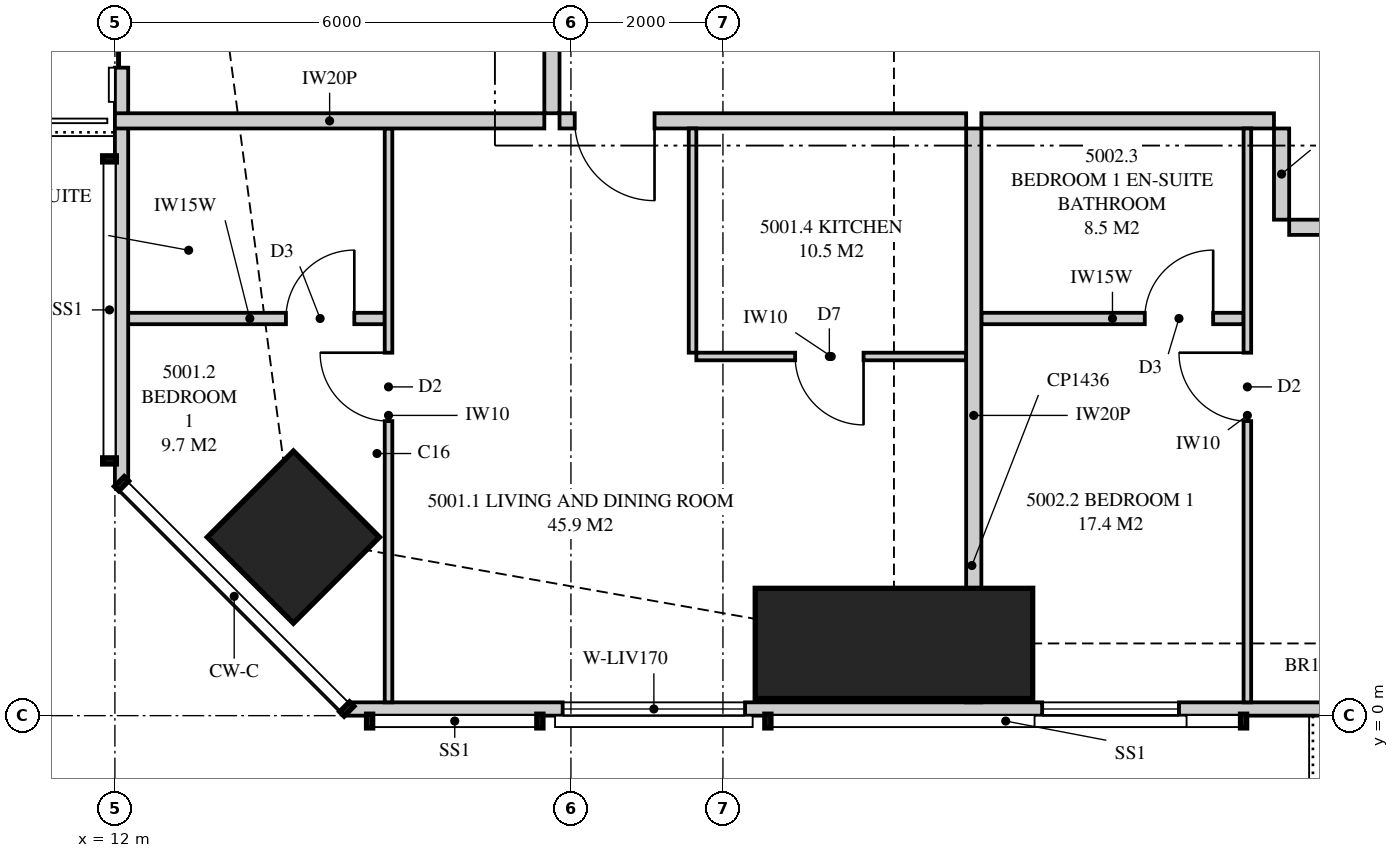
"""IFC4 building model, lengths in metres.
Left out: names, types, materials, properties, quantities, classifications, styles, units other than length and angle.
Written with IfcOpenShell. Run it as: python <this file> out.ifc"""

import sys

from ifc_helpers import new_model, si_unit, direction, frame, frame_2d, origin, origin_2d, place, context, subcontext, project, spatial, polyline, rectangle, outline, extrude, element, fill, save


model = new_model("IFC4")
c1 = context("Model", 3, precision=1e-05, world=origin(), true_north=direction((0.0, 1.0)))
c2 = subcontext(c1, "Body", "Model", "MODEL_VIEW")
j1 = project(units=[si_unit("LENGTHUNIT", "METRE"), si_unit("PLANEANGLEUNIT", "RADIAN")], contexts=[c1])
p1 = place(None, origin())
s1 = spatial("IfcSite", under=j1, at=p1, CompositionType="ELEMENT")
p2 = place(p1, origin())
s2 = spatial("IfcBuilding", under=s1, at=p2, CompositionType="ELEMENT")
p3 = place(p2, frame((0.0, 0.0, 184.5)))
s3 = spatial("IfcBuildingStorey", under=s2, at=p3, CompositionType="ELEMENT", Elevation=184.5)
p4 = place(p3, frame((14.348, 2.348, 0.0), z_axis=(0.0, 0.0, 1.0), x_axis=(0.707106781187, 0.707106781187, 0.0)))
e1 = element("IfcColumn", 1, at=p4, inside=s3, PredefinedType="COLUMN", context=c2, shape_type="SweptSolid", body=[
    extrude(rectangle(XDim=1.6, YDim=1.6, at=origin_2d()), origin(), (0.0, 0.0, 1.0), 3.35),
])
p5 = place(p3, frame((22.25, 0.95, 0.0), z_axis=(0.0, 0.0, 1.0), x_axis=(0.0, 1.0, 0.0)))
e2 = element("IfcColumn", 2, at=p5, inside=s3, PredefinedType="COLUMN", context=c2, shape_type="SweptSolid", body=[
    extrude(rectangle(XDim=1.45, YDim=3.65, at=origin_2d()), origin(), (0.0, 0.0, 1.0), 3.35),
])
p6 = place(p3, frame((15.051, 0.087, 0.0), z_axis=(0.0, 0.0, 1.0), x_axis=(1.0, 0.0, 0.0)))
e3 = element("IfcWall", 3, at=p6, inside=s3, PredefinedType="SOLIDWALL", context=c2, shape_type="SweptSolid", body=[
    extrude(outline(polyline([(0.0, 0.0), (34.897, 0.0), (34.897, 3.11), (27.91, 3.11), (27.91, 2.15), (27.836, 2.15), (27.836, 3.11), (27.699, 3.11), (27.699, 2.15), (7.199, 2.15), (7.199, 3.11), (7.062, 3.11), (7.062, 2.15), (6.987, 2.15), (6.987, 3.11), (0.0, 3.11), (0.0, 0.0)])), frame((0.0, 0.087, 0.0), z_axis=(0.0, -1.0, 0.0), x_axis=(1.0, 0.0, 0.0)), (0.0, 0.0, 1.0), 0.175),
])
p7 = place(p6, frame((2.84, 0.0, 0.4)))
e4 = element("IfcOpeningElement", 4, at=p7, cuts=e3, PredefinedType="OPENING", context=c2, shape_type="SweptSolid", body=[
    extrude(rectangle(XDim=2.4, YDim=1.7, at=frame_2d((1.2, 0.85))), frame((0.0, 0.097, 0.0), z_axis=(0.0, -1.0, 0.0), x_axis=(1.0, 0.0, 0.0)), (0.0, 0.0, 1.0), 0.195),
])
p8 = place(p6, frame((9.149, 0.0, 0.4)))
e5 = element("IfcOpeningElement", 5, at=p8, cuts=e3, PredefinedType="OPENING", context=c2, shape_type="SweptSolid", body=[
    extrude(rectangle(XDim=1.8, YDim=1.7, at=frame_2d((0.9, 0.85))), frame((0.0, 0.097, 0.0), z_axis=(0.0, -1.0, 0.0), x_axis=(1.0, 0.0, 0.0)), (0.0, 0.0, 1.0), 0.195),
])
p9 = place(p6, frame((13.561, 0.0, 0.0)))
e6 = element("IfcOpeningElement", 6, at=p9, cuts=e3, PredefinedType="OPENING", context=c2, shape_type="SweptSolid", body=[
    extrude(rectangle(XDim=1.8, YDim=2.1, at=frame_2d((0.9, 1.05))), frame((0.0, 0.097, 0.0), z_axis=(0.0, -1.0, 0.0), x_axis=(1.0, 0.0, 0.0)), (0.0, 0.0, 1.0), 0.195),
])
p10 = place(p6, frame((19.849, 0.0, 0.4)))
e7 = element("IfcOpeningElement", 7, at=p10, cuts=e3, PredefinedType="OPENING", context=c2, shape_type="SweptSolid", body=[
    extrude(rectangle(XDim=1.8, YDim=1.7, at=frame_2d((0.9, 0.85))), frame((0.0, 0.097, 0.0), z_axis=(0.0, -1.0, 0.0), x_axis=(1.0, 0.0, 0.0)), (0.0, 0.0, 1.0), 0.195),
])
p11 = place(p6, frame((23.449, 0.0, 0.4)))
e8 = element("IfcOpeningElement", 8, at=p11, cuts=e3, PredefinedType="OPENING", context=c2, shape_type="SweptSolid", body=[
    extrude(rectangle(XDim=1.8, YDim=1.7, at=frame_2d((0.9, 0.85))), frame((0.0, 0.097, 0.0), z_axis=(0.0, -1.0, 0.0), x_axis=(1.0, 0.0, 0.0)), (0.0, 0.0, 1.0), 0.195),
])
p12 = place(p6, frame((29.636, 0.0, 0.4)))
e9 = element("IfcOpeningElement", 9, at=p12, cuts=e3, PredefinedType="OPENING", context=c2, shape_type="SweptSolid", body=[
    extrude(rectangle(XDim=1.8, YDim=1.7, at=frame_2d((0.9, 0.85))), frame((0.0, 0.097, 0.0), z_axis=(0.0, -1.0, 0.0), x_axis=(1.0, 0.0, 0.0)), (0.0, 0.0, 1.0), 0.195),
])
p13 = place(p6, frame((32.56, 0.0, 0.4)))
e10 = element("IfcOpeningElement", 10, at=p13, cuts=e3, PredefinedType="OPENING", context=c2, shape_type="SweptSolid", body=[
    extrude(rectangle(XDim=1.8, YDim=1.7, at=frame_2d((0.9, 0.85))), frame((0.0, 0.097, 0.0), z_axis=(0.0, -1.0, 0.0), x_axis=(1.0, 0.0, 0.0)), (0.0, 0.0, 1.0), 0.195),
])
p14 = place(p3, frame((12.087, 32.949, 0.0), z_axis=(0.0, 0.0, 1.0), x_axis=(0.0, -1.0, 0.0)))
e11 = element("IfcWall", 11, at=p14, inside=s3, PredefinedType="SOLIDWALL", context=c2, shape_type="SweptSolid", body=[
    extrude(outline(polyline([(0.0, 0.0), (29.897, 0.0), (29.897, 3.11), (20.191, 3.11), (20.191, 2.15), (20.051, 2.15), (20.051, 3.11), (19.949, 3.11), (19.949, 2.15), (7.949, 2.15), (7.949, 3.11), (7.823, 3.11), (7.823, 2.15), (7.73, 2.15), (7.73, 3.11), (0.0, 3.11), (0.0, 0.0)])), frame((0.0, 0.087, 0.0), z_axis=(0.0, -1.0, 0.0), x_axis=(1.0, 0.0, 0.0)), (0.0, 0.0, 1.0), 0.175),
])
p15 = place(p14, frame((1.599, 0.0, 0.4)))
e12 = element("IfcOpeningElement", 12, at=p15, cuts=e11, PredefinedType="OPENING", context=c2, shape_type="SweptSolid", body=[
    extrude(rectangle(XDim=1.2, YDim=1.7, at=frame_2d((0.6, 0.85))), frame((0.0, 0.097, 0.0), z_axis=(0.0, -1.0, 0.0), x_axis=(1.0, 0.0, 0.0)), (0.0, 0.0, 1.0), 0.195),
])
p16 = place(p14, frame((9.899, 0.0, 0.4)))
e13 = element("IfcOpeningElement", 13, at=p16, cuts=e11, PredefinedType="OPENING", context=c2, shape_type="SweptSolid", body=[
    extrude(rectangle(XDim=1.8, YDim=1.7, at=frame_2d((0.9, 0.85))), frame((0.0, 0.097, 0.0), z_axis=(0.0, -1.0, 0.0), x_axis=(1.0, 0.0, 0.0)), (0.0, 0.0, 1.0), 0.195),
])
p17 = place(p14, frame((13.024, 0.0, 0.4)))
e14 = element("IfcOpeningElement", 14, at=p17, cuts=e11, PredefinedType="OPENING", context=c2, shape_type="SweptSolid", body=[
    extrude(rectangle(XDim=1.8, YDim=1.7, at=frame_2d((0.9, 0.85))), frame((0.0, 0.097, 0.0), z_axis=(0.0, -1.0, 0.0), x_axis=(1.0, 0.0, 0.0)), (0.0, 0.0, 1.0), 0.195),
])
p18 = place(p14, frame((16.201, 0.0, 0.4)))
e15 = element("IfcOpeningElement", 15, at=p18, cuts=e11, PredefinedType="OPENING", context=c2, shape_type="SweptSolid", body=[
    extrude(rectangle(XDim=1.8, YDim=1.7, at=frame_2d((0.9, 0.85))), frame((0.0, 0.097, 0.0), z_axis=(0.0, -1.0, 0.0), x_axis=(1.0, 0.0, 0.0)), (0.0, 0.0, 1.0), 0.195),
])
p19 = place(p14, frame((22.624, 0.0, 0.0)))
e16 = element("IfcOpeningElement", 16, at=p19, cuts=e11, PredefinedType="OPENING", context=c2, shape_type="SweptSolid", body=[
    extrude(rectangle(XDim=1.8, YDim=2.1, at=frame_2d((0.9, 1.05))), frame((0.0, 0.097, 0.0), z_axis=(0.0, -1.0, 0.0), x_axis=(1.0, 0.0, 0.0)), (0.0, 0.0, 1.0), 0.195),
])
p20 = place(p3, frame((23.3, 0.175, 0.0), z_axis=(0.0, 0.0, 1.0), x_axis=(0.0, 1.0, 0.0)))
e17 = element("IfcWall", 17, at=p20, inside=s3, PredefinedType="PARTITIONING", context=c2, shape_type="SweptSolid", body=[
    extrude(outline(polyline([(0.529, 2.15), (0.0, 2.15), (0.0, 0.0), (0.529, 0.0), (0.529, 0.472), (1.021, 0.472), (1.021, 0.0), (7.55, 0.0), (7.55, 3.11), (1.685, 3.11), (1.685, 2.15), (1.021, 2.15), (1.021, 1.678), (0.529, 1.678), (0.529, 2.15)])), frame((0.0, 0.1, 0.0), z_axis=(0.0, -1.0, 0.0), x_axis=(1.0, 0.0, 0.0)), (0.0, 0.0, 1.0), 0.2),
])
p21 = place(p3, frame((17.85, 7.825, 0.0), z_axis=(0.0, 0.0, 1.0), x_axis=(1.0, 0.0, 0.0)))
e18 = element("IfcWall", 18, at=p21, inside=s3, PredefinedType="PARTITIONING", context=c2, shape_type="SweptSolid", body=[
    extrude(outline(polyline([(0.0, 0.0), (5.35, 0.0), (5.35, 3.11), (4.737, 3.11), (4.737, 2.541), (4.062, 2.541), (4.062, 3.11), (0.0, 3.11), (0.0, 0.0)])), frame((0.0, 0.1, 0.0), z_axis=(0.0, -1.0, 0.0), x_axis=(1.0, 0.0, 0.0)), (0.0, 0.0, 1.0), 0.2),
])
p22 = place(p21, frame((0.2, 0.0, 0.0)))
e19 = element("IfcOpeningElement", 19, at=p22, cuts=e18, PredefinedType="OPENING", context=c2, shape_type="SweptSolid", body=[
    extrude(rectangle(XDim=1.05, YDim=2.2, at=frame_2d((0.525, 1.1))), frame((0.0, 0.11, 0.0), z_axis=(0.0, -1.0, 0.0), x_axis=(1.0, 0.0, 0.0)), (0.0, 0.0, 1.0), 0.22),
])
p23 = place(p3, frame((15.6, 0.175, 0.0), z_axis=(0.0, 0.0, 1.0), x_axis=(0.0, 1.0, 0.0)))
e20 = element("IfcWall", 20, at=p23, inside=s3, PredefinedType="PARTITIONING", context=c2, shape_type="SweptSolid", body=[
    extrude(outline(polyline([(0.0, 0.0), (7.55, 0.0), (7.55, 3.11), (2.825, 3.11), (2.825, 2.15), (1.079, 2.15), (1.079, 3.11), (0.0, 3.11), (0.0, 0.0)])), frame((0.0, 0.05, 0.0), z_axis=(0.0, -1.0, 0.0), x_axis=(1.0, 0.0, 0.0)), (0.0, 0.0, 1.0), 0.1),
])
p24 = place(p23, frame((3.7, 0.0, 0.0)))
e21 = element("IfcOpeningElement", 21, at=p24, cuts=e20, PredefinedType="OPENING", context=c2, shape_type="SweptSolid", body=[
    extrude(rectangle(XDim=0.9, YDim=2.1, at=frame_2d((0.45, 1.05))), frame((0.0, 0.06, 0.0), z_axis=(0.0, -1.0, 0.0), x_axis=(1.0, 0.0, 0.0)), (0.0, 0.0, 1.0), 0.12),
])
p25 = place(p3, frame((12.0, 5.225, 0.0), z_axis=(0.0, 0.0, 1.0), x_axis=(1.0, 0.0, 0.0)))
e22 = element("IfcWall", 22, at=p25, inside=s3, PredefinedType="PLUMBINGWALL", context=c2, shape_type="SweptSolid", body=[
    extrude(outline(polyline([(0.0, 0.0), (3.55, 0.0), (3.55, 3.11), (2.863, 3.11), (2.863, 2.15), (1.078, 2.15), (1.078, 3.11), (0.0, 3.11), (0.0, 0.0)])), frame((0.0, 0.075, 0.0), z_axis=(0.0, -1.0, 0.0), x_axis=(1.0, 0.0, 0.0)), (0.0, 0.0, 1.0), 0.15),
])
p26 = place(p25, frame((2.25, 0.0, 0.0)))
e23 = element("IfcOpeningElement", 23, at=p26, cuts=e22, PredefinedType="OPENING", context=c2, shape_type="SweptSolid", body=[
    extrude(rectangle(XDim=0.9, YDim=2.1, at=frame_2d((0.45, 1.05))), frame((0.0, 0.085, 0.0), z_axis=(0.0, -1.0, 0.0), x_axis=(1.0, 0.0, 0.0)), (0.0, 0.0, 1.0), 0.17),
])
p27 = place(p3, frame((19.65, 4.725, 0.0), z_axis=(0.0, 0.0, 1.0), x_axis=(1.0, 0.0, 0.0)))
e24 = element("IfcWall", 24, at=p27, inside=s3, PredefinedType="PARTITIONING", context=c2, shape_type="SweptSolid", body=[
    extrude(outline(polyline([(0.0, 0.0), (3.55, 0.0), (3.55, 3.11), (2.887, 3.11), (2.887, 2.541), (2.312, 2.541), (2.312, 3.11), (0.0, 3.11), (0.0, 0.0)])), frame((0.0, 0.05, 0.0), z_axis=(0.0, -1.0, 0.0), x_axis=(1.0, 0.0, 0.0)), (0.0, 0.0, 1.0), 0.1),
])
p28 = place(p27, frame((1.3, 0.0, 0.0)))
e25 = element("IfcOpeningElement", 25, at=p28, cuts=e24, PredefinedType="OPENING", context=c2, shape_type="SweptSolid", body=[
    extrude(rectangle(XDim=0.9, YDim=2.1, at=frame_2d((0.45, 1.05))), frame((0.0, 0.06, 0.0), z_axis=(0.0, -1.0, 0.0), x_axis=(1.0, 0.0, 0.0)), (0.0, 0.0, 1.0), 0.12),
])
p29 = place(p3, frame((19.6, 4.775, 0.0), z_axis=(0.0, 0.0, 1.0), x_axis=(0.0, 1.0, 0.0)))
e26 = element("IfcWall", 26, at=p29, inside=s3, PredefinedType="PARTITIONING", context=c2, shape_type="SweptSolid", body=[
    extrude(rectangle(XDim=2.95, YDim=0.1, at=frame_2d((1.475, 0.0))), origin(), (0.0, 0.0, 1.0), 3.11),
])
p30 = place(p3, frame((23.4, 7.825, 0.0), z_axis=(0.0, 0.0, 1.0), x_axis=(1.0, 0.0, 0.0)))
e27 = element("IfcWall", 27, at=p30, inside=s3, PredefinedType="PARTITIONING", context=c2, shape_type="SweptSolid", body=[
    extrude(rectangle(XDim=3.85, YDim=0.2, at=frame_2d((1.925, 0.0))), origin(), (0.0, 0.0, 1.0), 3.11),
])
p31 = place(p3, frame((26.9, 0.175, 0.0), z_axis=(0.0, 0.0, 1.0), x_axis=(0.0, 1.0, 0.0)))
e28 = element("IfcWall", 28, at=p31, inside=s3, PredefinedType="PARTITIONING", context=c2, shape_type="SweptSolid", body=[
    extrude(outline(polyline([(0.0, 0.0), (7.55, 0.0), (7.55, 3.11), (1.635, 3.11), (1.635, 2.15), (0.0, 2.15), (0.0, 3.11), (0.0, 0.0)])), frame((0.0, 0.05, 0.0), z_axis=(0.0, -1.0, 0.0), x_axis=(1.0, 0.0, 0.0)), (0.0, 0.0, 1.0), 0.1),
])
p32 = place(p31, frame((3.7, 0.0, 0.0)))
e29 = element("IfcOpeningElement", 29, at=p32, cuts=e28, PredefinedType="OPENING", context=c2, shape_type="SweptSolid", body=[
    extrude(rectangle(XDim=0.9, YDim=2.1, at=frame_2d((0.45, 1.05))), frame((0.0, 0.06, 0.0), z_axis=(0.0, -1.0, 0.0), x_axis=(1.0, 0.0, 0.0)), (0.0, 0.0, 1.0), 0.12),
])
p33 = place(p3, frame((23.4, 5.225, 0.0), z_axis=(0.0, 0.0, 1.0), x_axis=(1.0, 0.0, 0.0)))
e30 = element("IfcWall", 30, at=p33, inside=s3, PredefinedType="PLUMBINGWALL", context=c2, shape_type="SweptSolid", body=[
    extrude(rectangle(XDim=3.45, YDim=0.15, at=frame_2d((1.725, 0.0))), origin(), (0.0, 0.0, 1.0), 3.11),
])
p34 = place(p33, frame((2.15, 0.0, 0.0)))
e31 = element("IfcOpeningElement", 31, at=p34, cuts=e30, PredefinedType="OPENING", context=c2, shape_type="SweptSolid", body=[
    extrude(rectangle(XDim=0.9, YDim=2.1, at=frame_2d((0.45, 1.05))), frame((0.0, 0.085, 0.0), z_axis=(0.0, -1.0, 0.0), x_axis=(1.0, 0.0, 0.0)), (0.0, 0.0, 1.0), 0.17),
])
p35 = place(p3, frame((12.0, 7.825, 0.0), z_axis=(0.0, 0.0, 1.0), x_axis=(1.0, 0.0, 0.0)))
e32 = element("IfcWall", 32, at=p35, inside=s3, PredefinedType="PARTITIONING", context=c2, shape_type="SweptSolid", body=[
    extrude(outline(polyline([(0.0, 0.0), (5.65, 0.0), (5.65, 3.11), (2.547, 3.11), (2.547, 2.15), (0.712, 2.15), (0.712, 3.11), (0.0, 3.11), (0.0, 0.0)])), frame((0.0, 0.1, 0.0), z_axis=(0.0, -1.0, 0.0), x_axis=(1.0, 0.0, 0.0)), (0.0, 0.0, 1.0), 0.2),
])
p36 = place(p3, frame((17.75, 7.925, 0.0), z_axis=(0.0, 0.0, 1.0), x_axis=(0.0, 1.0, 0.0)))
e33 = element("IfcWall", 33, at=p36, inside=s3, PredefinedType="PARTITIONING", context=c2, shape_type="SweptSolid", body=[
    extrude(outline(polyline([(0.0, 0.0), (21.15, 0.0), (21.15, 3.11), (17.412, 3.11), (17.412, 2.541), (16.738, 2.541), (16.738, 3.11), (5.412, 3.11), (5.412, 2.541), (4.738, 2.541), (4.738, 3.11), (0.0, 3.11), (0.0, 0.0)])), frame((0.0, 0.1, 0.0), z_axis=(0.0, -1.0, 0.0), x_axis=(1.0, 0.0, 0.0)), (0.0, 0.0, 1.0), 0.2),
])
p37 = place(p36, frame((16.25, 0.0, 0.0)))
e34 = element("IfcOpeningElement", 34, at=p37, cuts=e33, PredefinedType="OPENING", context=c2, shape_type="SweptSolid", body=[
    extrude(rectangle(XDim=1.05, YDim=2.2, at=frame_2d((0.525, 1.1))), frame((0.0, 0.11, 0.0), z_axis=(0.0, -1.0, 0.0), x_axis=(1.0, 0.0, 0.0)), (0.0, 0.0, 1.0), 0.22),
])
p38 = place(p3, frame((27.45, 6.425, 0.0), z_axis=(0.0, 0.0, 1.0), x_axis=(1.0, 0.0, 0.0)))
e35 = element("IfcWall", 35, at=p38, inside=s3, PredefinedType="PARTITIONING", context=c2, shape_type="SweptSolid", body=[
    extrude(rectangle(XDim=2.4, YDim=0.2, at=frame_2d((1.2, 0.0))), origin(), (0.0, 0.0, 1.0), 3.11),
])
p39 = place(p38, frame((0.7, 0.0, 0.0)))
e36 = element("IfcOpeningElement", 36, at=p39, cuts=e35, PredefinedType="OPENING", context=c2, shape_type="SweptSolid", body=[
    extrude(rectangle(XDim=1.05, YDim=2.2, at=frame_2d((0.525, 1.1))), frame((0.0, 0.11, 0.0), z_axis=(0.0, -1.0, 0.0), x_axis=(1.0, 0.0, 0.0)), (0.0, 0.0, 1.0), 0.22),
])
p40 = place(p3, frame((27.35, 7.725, 0.0), z_axis=(0.0, 0.0, 1.0), x_axis=(0.0, -1.0, 0.0)))
e37 = element("IfcWall", 37, at=p40, inside=s3, PredefinedType="PARTITIONING", context=c2, shape_type="SweptSolid", body=[
    extrude(rectangle(XDim=1.2, YDim=0.2, at=frame_2d((0.6, 0.0))), origin(), (0.0, 0.0, 1.0), 3.11),
])
p41 = place(p7, origin())
e38 = element("IfcWindow", 38, at=p41, inside=s3, PartitioningType="SINGLE_PANEL", PredefinedType="WINDOW", context=c2, shape_type="SweptSolid", body=[
    extrude(rectangle(XDim=2.4, YDim=1.7, at=frame_2d((1.2, 0.85))), frame((0.0, 0.03, 0.0), z_axis=(0.0, -1.0, 0.0), x_axis=(1.0, 0.0, 0.0)), (0.0, 0.0, 1.0), 0.06),
])
fill(e4, e38)
p42 = place(p8, origin())
e39 = element("IfcWindow", 39, at=p42, inside=s3, PartitioningType="SINGLE_PANEL", PredefinedType="WINDOW", context=c2, shape_type="SweptSolid", body=[
    extrude(rectangle(XDim=1.8, YDim=1.7, at=frame_2d((0.9, 0.85))), frame((0.0, 0.03, 0.0), z_axis=(0.0, -1.0, 0.0), x_axis=(1.0, 0.0, 0.0)), (0.0, 0.0, 1.0), 0.06),
])
fill(e5, e39)
p43 = place(p19, origin())
e40 = element("IfcDoor", 40, at=p43, inside=s3, OperationType="SLIDING_TO_LEFT", PredefinedType="DOOR", context=c2, shape_type="SweptSolid", body=[
    extrude(rectangle(XDim=1.8, YDim=2.1, at=frame_2d((0.9, 1.05))), frame((0.0, 0.025, 0.0), z_axis=(0.0, -1.0, 0.0), x_axis=(1.0, 0.0, 0.0)), (0.0, 0.0, 1.0), 0.05),
])
fill(e16, e40)
p44 = place(p22, frame((1.05, 0.0, 0.0), z_axis=(0.0, 0.0, 1.0), x_axis=(-1.0, 0.0, 0.0)))
e41 = element("IfcDoor", 41, at=p44, inside=s3, OperationType="SINGLE_SWING_LEFT", PredefinedType="DOOR", context=c2, shape_type="SweptSolid", body=[
    extrude(rectangle(XDim=1.05, YDim=2.2, at=frame_2d((0.525, 1.1))), frame((0.0, 0.025, 0.0), z_axis=(0.0, -1.0, 0.0), x_axis=(1.0, 0.0, 0.0)), (0.0, 0.0, 1.0), 0.05),
])
fill(e19, e41)
p45 = place(p24, origin())
e42 = element("IfcDoor", 42, at=p45, inside=s3, OperationType="SINGLE_SWING_RIGHT", PredefinedType="DOOR", context=c2, shape_type="SweptSolid", body=[
    extrude(rectangle(XDim=0.9, YDim=2.1, at=frame_2d((0.45, 1.05))), frame((0.0, 0.025, 0.0), z_axis=(0.0, -1.0, 0.0), x_axis=(1.0, 0.0, 0.0)), (0.0, 0.0, 1.0), 0.05),
])
fill(e21, e42)
p46 = place(p26, origin())
e43 = element("IfcDoor", 43, at=p46, inside=s3, OperationType="SINGLE_SWING_RIGHT", PredefinedType="DOOR", context=c2, shape_type="SweptSolid", body=[
    extrude(rectangle(XDim=0.9, YDim=2.1, at=frame_2d((0.45, 1.05))), frame((0.0, 0.025, 0.0), z_axis=(0.0, -1.0, 0.0), x_axis=(1.0, 0.0, 0.0)), (0.0, 0.0, 1.0), 0.05),
])
fill(e23, e43)
p47 = place(p28, frame((0.9, 0.0, 0.0), z_axis=(0.0, 0.0, 1.0), x_axis=(-1.0, 0.0, 0.0)))
e44 = element("IfcDoor", 44, at=p47, inside=s3, OperationType="SINGLE_SWING_LEFT", PredefinedType="DOOR", context=c2, shape_type="SweptSolid", body=[
    extrude(rectangle(XDim=0.9, YDim=2.1, at=frame_2d((0.45, 1.05))), frame((0.0, 0.025, 0.0), z_axis=(0.0, -1.0, 0.0), x_axis=(1.0, 0.0, 0.0)), (0.0, 0.0, 1.0), 0.05),
])
fill(e25, e44)
p48 = place(p32, origin())
e45 = element("IfcDoor", 45, at=p48, inside=s3, OperationType="SINGLE_SWING_RIGHT", PredefinedType="DOOR", context=c2, shape_type="SweptSolid", body=[
    extrude(rectangle(XDim=0.9, YDim=2.1, at=frame_2d((0.45, 1.05))), frame((0.0, 0.025, 0.0), z_axis=(0.0, -1.0, 0.0), x_axis=(1.0, 0.0, 0.0)), (0.0, 0.0, 1.0), 0.05),
])
fill(e29, e45)
p49 = place(p34, origin())
e46 = element("IfcDoor", 46, at=p49, inside=s3, OperationType="SINGLE_SWING_RIGHT", PredefinedType="DOOR", context=c2, shape_type="SweptSolid", body=[
    extrude(rectangle(XDim=0.9, YDim=2.1, at=frame_2d((0.45, 1.05))), frame((0.0, 0.025, 0.0), z_axis=(0.0, -1.0, 0.0), x_axis=(1.0, 0.0, 0.0)), (0.0, 0.0, 1.0), 0.05),
])
fill(e31, e46)
save(model, sys.argv[1])
